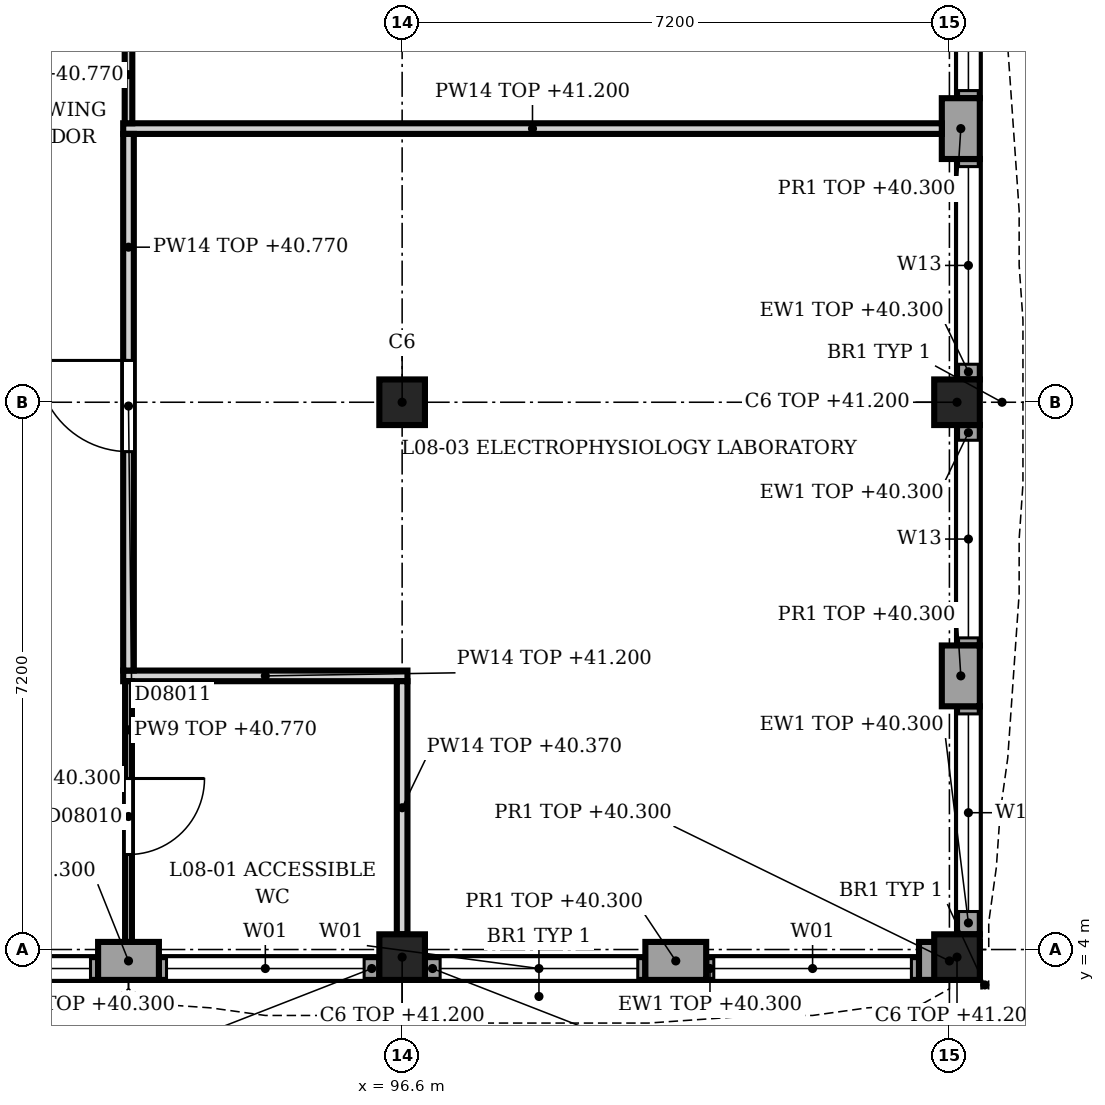
"""IFC4 building model, lengths in metres.
Left out: names, types, materials, properties, quantities, classifications, styles, units other than length and angle.
Written with IfcOpenShell. Run it as: python <this file> out.ifc"""

import sys

from ifc_helpers import new_model, si_unit, direction, frame, frame_2d, origin, origin_2d, place, context, subcontext, project, spatial, rectangle, extrude, element, fill, save


model = new_model("IFC4")
c1 = context("Model", 3, precision=1e-05, world=origin(), true_north=direction((0.0, 1.0)))
c2 = subcontext(c1, "Body", "Model", "MODEL_VIEW")
j1 = project(units=[si_unit("LENGTHUNIT", "METRE"), si_unit("PLANEANGLEUNIT", "RADIAN")], contexts=[c1])
p1 = place(None, origin())
s1 = spatial("IfcSite", under=j1, at=p1, CompositionType="ELEMENT")
p2 = place(p1, origin())
s2 = spatial("IfcBuilding", under=s1, at=p2, CompositionType="ELEMENT")
p3 = place(p2, frame((0.0, 0.0, 36.9)))
s3 = spatial("IfcBuildingStorey", under=s2, at=p3, CompositionType="ELEMENT", Elevation=36.9)
p4 = place(p3, frame((96.6, 3.9, 0.0), z_axis=(0.0, 0.0, 1.0), x_axis=(1.0, 0.0, 0.0)))
e1 = element("IfcColumn", 1, at=p4, inside=s3, PredefinedType="COLUMN", context=c2, shape_type="SweptSolid", body=[
    extrude(rectangle(XDim=0.6, YDim=0.6, at=origin_2d()), origin(), (0.0, 0.0, 1.0), 4.3),
])
p5 = place(p3, frame((96.6, 11.2, 0.0), z_axis=(0.0, 0.0, 1.0), x_axis=(1.0, 0.0, 0.0)))
e2 = element("IfcColumn", 2, at=p5, inside=s3, PredefinedType="COLUMN", context=c2, shape_type="SweptSolid", body=[
    extrude(rectangle(XDim=0.6, YDim=0.6, at=origin_2d()), origin(), (0.0, 0.0, 1.0), 4.5),
])
for number, where, z_axis, x_axis in (
    (3, (103.9, 3.9, 0.0), (0.0, 0.0, 1.0), (1.0, 0.0, 0.0)),
    (4, (103.9, 11.2, 0.0), (0.0, 0.0, 1.0), (1.0, 0.0, 0.0)),
):
    element("IfcColumn", number, at=place(p3, frame(where, z_axis=z_axis, x_axis=x_axis)), inside=s3, PredefinedType="COLUMN", context=c2, shape_type="SweptSolid", body=[
        extrude(rectangle(XDim=0.6, YDim=0.6, at=origin_2d()), origin(), (0.0, 0.0, 1.0), 4.3),
    ])
for number, where, z_axis, x_axis in (
    (5, (103.95, 15.2, 0.0), (0.0, 0.0, 1.0), (0.0, -1.0, 0.0)),
    (6, (103.95, 8.0, 0.0), (0.0, 0.0, 1.0), (0.0, -1.0, 0.0)),
):
    element("IfcWall", number, at=place(p3, frame(where, z_axis=z_axis, x_axis=x_axis)), inside=s3, PredefinedType="SOLIDWALL", context=c2, shape_type="SweptSolid", body=[
        extrude(rectangle(XDim=0.8, YDim=0.5, at=frame_2d((0.4, 0.0))), origin(), (0.0, 0.0, 1.0), 3.4),
    ])
p6 = place(p3, frame((104.05, 18.1, 0.0), z_axis=(0.0, 0.0, 1.0), x_axis=(0.0, -1.0, 0.0)))
e7 = element("IfcWall", 7, at=p6, inside=s3, PredefinedType="SOLIDWALL", context=c2, shape_type="SweptSolid", body=[
    extrude(rectangle(XDim=2.9, YDim=0.3, at=frame_2d((1.45, 0.0))), origin(), (0.0, 0.0, 1.0), 3.4),
])
p7 = place(p6, frame((0.2, 0.0, 0.9)))
e8 = element("IfcOpeningElement", 8, at=p7, cuts=e7, PredefinedType="OPENING", context=c2, shape_type="SweptSolid", body=[
    extrude(rectangle(XDim=2.6, YDim=2.2, at=frame_2d((1.3, 1.1))), frame((0.0, 0.16, 0.0), z_axis=(0.0, -1.0, 0.0), x_axis=(1.0, 0.0, 0.0)), (0.0, 0.0, 1.0), 0.32),
])
p8 = place(p3, frame((104.05, 14.4, 0.0), z_axis=(0.0, 0.0, 1.0), x_axis=(0.0, -1.0, 0.0)))
e9 = element("IfcWall", 9, at=p8, inside=s3, PredefinedType="SOLIDWALL", context=c2, shape_type="SweptSolid", body=[
    extrude(rectangle(XDim=2.9, YDim=0.3, at=frame_2d((1.45, 0.0))), origin(), (0.0, 0.0, 1.0), 3.4),
])
p9 = place(p8, frame((0.1, 0.0, 0.9)))
e10 = element("IfcOpeningElement", 10, at=p9, cuts=e9, PredefinedType="OPENING", context=c2, shape_type="SweptSolid", body=[
    extrude(rectangle(XDim=2.6, YDim=2.2, at=frame_2d((1.3, 1.1))), frame((0.0, 0.16, 0.0), z_axis=(0.0, -1.0, 0.0), x_axis=(1.0, 0.0, 0.0)), (0.0, 0.0, 1.0), 0.32),
])
p10 = place(p3, frame((104.05, 10.9, 0.0), z_axis=(0.0, 0.0, 1.0), x_axis=(0.0, -1.0, 0.0)))
e11 = element("IfcWall", 11, at=p10, inside=s3, PredefinedType="SOLIDWALL", context=c2, shape_type="SweptSolid", body=[
    extrude(rectangle(XDim=2.9, YDim=0.3, at=frame_2d((1.45, 0.0))), origin(), (0.0, 0.0, 1.0), 3.4),
])
p11 = place(p10, frame((0.2, 0.0, 0.9)))
e12 = element("IfcOpeningElement", 12, at=p11, cuts=e11, PredefinedType="OPENING", context=c2, shape_type="SweptSolid", body=[
    extrude(rectangle(XDim=2.6, YDim=2.2, at=frame_2d((1.3, 1.1))), frame((0.0, 0.16, 0.0), z_axis=(0.0, -1.0, 0.0), x_axis=(1.0, 0.0, 0.0)), (0.0, 0.0, 1.0), 0.32),
])
p12 = place(p3, frame((104.05, 7.2, 0.0), z_axis=(0.0, 0.0, 1.0), x_axis=(0.0, -1.0, 0.0)))
e13 = element("IfcWall", 13, at=p12, inside=s3, PredefinedType="SOLIDWALL", context=c2, shape_type="SweptSolid", body=[
    extrude(rectangle(XDim=3.0, YDim=0.3, at=frame_2d((1.5, 0.0))), origin(), (0.0, 0.0, 1.0), 3.4),
])
p13 = place(p12, frame((0.1, 0.0, 0.9)))
e14 = element("IfcOpeningElement", 14, at=p13, cuts=e13, PredefinedType="OPENING", context=c2, shape_type="SweptSolid", body=[
    extrude(rectangle(XDim=2.6, YDim=2.2, at=frame_2d((1.3, 1.1))), frame((0.0, 0.16, 0.0), z_axis=(0.0, -1.0, 0.0), x_axis=(1.0, 0.0, 0.0)), (0.0, 0.0, 1.0), 0.32),
])
for number, where, z_axis, x_axis in (
    (15, (104.2, 3.85, 0.0), (0.0, 0.0, 1.0), (-1.0, 0.0, 0.0)),
    (16, (100.6, 3.85, 0.0), (0.0, 0.0, 1.0), (-1.0, 0.0, 0.0)),
):
    element("IfcWall", number, at=place(p3, frame(where, z_axis=z_axis, x_axis=x_axis)), inside=s3, PredefinedType="SOLIDWALL", context=c2, shape_type="SweptSolid", body=[
        extrude(rectangle(XDim=0.8, YDim=0.5, at=frame_2d((0.4, 0.0))), origin(), (0.0, 0.0, 1.0), 3.4),
    ])
p14 = place(p3, frame((93.4, 3.85, 0.0), z_axis=(0.0, 0.0, 1.0), x_axis=(-1.0, 0.0, 0.0)))
e17 = element("IfcWall", 17, at=p14, inside=s3, PredefinedType="SOLIDWALL", context=c2, shape_type="SweptSolid", body=[
    extrude(rectangle(XDim=0.8, YDim=0.5, at=frame_2d((0.4, 0.0))), origin(), (0.0, 0.0, 1.0), 3.4),
])
p15 = place(p3, frame((103.4, 3.75, 0.0), z_axis=(0.0, 0.0, 1.0), x_axis=(-1.0, 0.0, 0.0)))
e18 = element("IfcWall", 18, at=p15, inside=s3, PredefinedType="SOLIDWALL", context=c2, shape_type="SweptSolid", body=[
    extrude(rectangle(XDim=2.8, YDim=0.3, at=frame_2d((1.4, 0.0))), origin(), (0.0, 0.0, 1.0), 3.4),
])
p16 = place(p15, frame((0.1, 0.0, 0.9)))
e19 = element("IfcOpeningElement", 19, at=p16, cuts=e18, PredefinedType="OPENING", context=c2, shape_type="SweptSolid", body=[
    extrude(rectangle(XDim=2.6, YDim=2.4, at=frame_2d((1.3, 1.2))), frame((0.0, 0.16, 0.0), z_axis=(0.0, -1.0, 0.0), x_axis=(1.0, 0.0, 0.0)), (0.0, 0.0, 1.0), 0.32),
])
p17 = place(p3, frame((99.8, 3.75, 0.0), z_axis=(0.0, 0.0, 1.0), x_axis=(-1.0, 0.0, 0.0)))
e20 = element("IfcWall", 20, at=p17, inside=s3, PredefinedType="SOLIDWALL", context=c2, shape_type="SweptSolid", body=[
    extrude(rectangle(XDim=2.9, YDim=0.3, at=frame_2d((1.45, 0.0))), origin(), (0.0, 0.0, 1.0), 3.4),
])
p18 = place(p17, frame((0.1, 0.0, 0.9)))
e21 = element("IfcOpeningElement", 21, at=p18, cuts=e20, PredefinedType="OPENING", context=c2, shape_type="SweptSolid", body=[
    extrude(rectangle(XDim=2.6, YDim=2.4, at=frame_2d((1.3, 1.2))), frame((0.0, 0.16, 0.0), z_axis=(0.0, -1.0, 0.0), x_axis=(1.0, 0.0, 0.0)), (0.0, 0.0, 1.0), 0.32),
])
p19 = place(p3, frame((96.3, 3.75, 0.0), z_axis=(0.0, 0.0, 1.0), x_axis=(-1.0, 0.0, 0.0)))
e22 = element("IfcWall", 22, at=p19, inside=s3, PredefinedType="SOLIDWALL", context=c2, shape_type="SweptSolid", body=[
    extrude(rectangle(XDim=2.9, YDim=0.3, at=frame_2d((1.45, 0.0))), origin(), (0.0, 0.0, 1.0), 3.4),
])
p20 = place(p19, frame((0.2, 0.0, 0.9)))
e23 = element("IfcOpeningElement", 23, at=p20, cuts=e22, PredefinedType="OPENING", context=c2, shape_type="SweptSolid", body=[
    extrude(rectangle(XDim=2.6, YDim=2.4, at=frame_2d((1.3, 1.2))), frame((0.0, 0.16, 0.0), z_axis=(0.0, -1.0, 0.0), x_axis=(1.0, 0.0, 0.0)), (0.0, 0.0, 1.0), 0.32),
])
p21 = place(p3, frame((92.6, 3.75, 0.0), z_axis=(0.0, 0.0, 1.0), x_axis=(-1.0, 0.0, 0.0)))
e24 = element("IfcWall", 24, at=p21, inside=s3, PredefinedType="SOLIDWALL", context=c2, shape_type="SweptSolid", body=[
    extrude(rectangle(XDim=2.9, YDim=0.3, at=frame_2d((1.45, 0.0))), origin(), (0.0, 0.0, 1.0), 3.4),
])
p22 = place(p21, frame((0.1, 0.0, 0.9)))
e25 = element("IfcOpeningElement", 25, at=p22, cuts=e24, PredefinedType="OPENING", context=c2, shape_type="SweptSolid", body=[
    extrude(rectangle(XDim=2.6, YDim=2.4, at=frame_2d((1.3, 1.2))), frame((0.0, 0.16, 0.0), z_axis=(0.0, -1.0, 0.0), x_axis=(1.0, 0.0, 0.0)), (0.0, 0.0, 1.0), 0.32),
])
p23 = place(p3, frame((92.93, 7.6, 0.0), z_axis=(0.0, 0.0, 1.0), x_axis=(1.0, 0.0, 0.0)))
e26 = element("IfcWall", 26, at=p23, inside=s3, PredefinedType="PARTITIONING", context=c2, shape_type="SweptSolid", body=[
    extrude(rectangle(XDim=3.74, YDim=0.14, at=frame_2d((1.87, 0.0))), origin(), (0.0, 0.0, 1.0), 4.3),
])
p24 = place(p3, frame((92.93, 14.8, 0.0), z_axis=(0.0, 0.0, 1.0), x_axis=(1.0, 0.0, 0.0)))
e27 = element("IfcWall", 27, at=p24, inside=s3, PredefinedType="PARTITIONING", context=c2, shape_type="SweptSolid", body=[
    extrude(rectangle(XDim=10.77, YDim=0.14, at=frame_2d((5.385, 0.0))), origin(), (0.0, 0.0, 1.0), 4.3),
])
p25 = place(p3, frame((93.0, 7.53, 0.0), z_axis=(0.0, 0.0, 1.0), x_axis=(0.0, -1.0, 0.0)))
e28 = element("IfcWall", 28, at=p25, inside=s3, PredefinedType="PARTITIONING", context=c2, shape_type="SweptSolid", body=[
    extrude(rectangle(XDim=3.43, YDim=0.09, at=frame_2d((1.715, 0.0))), origin(), (0.0, 0.0, 1.0), 3.87),
])
p26 = place(p25, frame((1.28, 0.0, 0.0)))
e29 = element("IfcOpeningElement", 29, at=p26, cuts=e28, PredefinedType="OPENING", context=c2, shape_type="SweptSolid", body=[
    extrude(rectangle(XDim=1.0, YDim=2.2, at=frame_2d((0.5, 1.1))), frame((0.0, 0.055, 0.0), z_axis=(0.0, -1.0, 0.0), x_axis=(1.0, 0.0, 0.0)), (0.0, 0.0, 1.0), 0.11),
])
p27 = place(p3, frame((93.0, 14.73, 0.0), z_axis=(0.0, 0.0, 1.0), x_axis=(0.0, -1.0, 0.0)))
e30 = element("IfcWall", 30, at=p27, inside=s3, PredefinedType="PARTITIONING", context=c2, shape_type="SweptSolid", body=[
    extrude(rectangle(XDim=7.06, YDim=0.14, at=frame_2d((3.53, 0.0))), origin(), (0.0, 0.0, 1.0), 3.87),
])
p28 = place(p27, frame((2.98, 0.0, 0.0)))
e31 = element("IfcOpeningElement", 31, at=p28, cuts=e30, PredefinedType="OPENING", context=c2, shape_type="SweptSolid", body=[
    extrude(rectangle(XDim=1.2, YDim=2.1, at=frame_2d((0.6, 1.05))), frame((0.0, 0.08, 0.0), z_axis=(0.0, -1.0, 0.0), x_axis=(1.0, 0.0, 0.0)), (0.0, 0.0, 1.0), 0.16),
])
p29 = place(p3, frame((93.0, 18.31, 0.0), z_axis=(0.0, 0.0, 1.0), x_axis=(0.0, -1.0, 0.0)))
e32 = element("IfcWall", 32, at=p29, inside=s3, PredefinedType="PARTITIONING", context=c2, shape_type="SweptSolid", body=[
    extrude(rectangle(XDim=3.44, YDim=0.1, at=frame_2d((1.72, 0.0))), origin(), (0.0, 0.0, 1.0), 3.87),
])
p30 = place(p29, frame((1.16, 0.0, 0.0)))
e33 = element("IfcOpeningElement", 33, at=p30, cuts=e32, PredefinedType="OPENING", context=c2, shape_type="SweptSolid", body=[
    extrude(rectangle(XDim=1.0, YDim=2.1, at=frame_2d((0.5, 1.05))), frame((0.0, 0.06, 0.0), z_axis=(0.0, -1.0, 0.0), x_axis=(1.0, 0.0, 0.0)), (0.0, 0.0, 1.0), 0.12),
])
p31 = place(p3, frame((96.6, 4.2, 0.0), z_axis=(0.0, 0.0, 1.0), x_axis=(0.0, 1.0, 0.0)))
e34 = element("IfcWall", 34, at=p31, inside=s3, PredefinedType="PARTITIONING", context=c2, shape_type="SweptSolid", body=[
    extrude(rectangle(XDim=3.33, YDim=0.14, at=frame_2d((1.665, 0.0))), origin(), (0.0, 0.0, 1.0), 3.47),
])
p32 = place(p7, origin())
e35 = element("IfcWindow", 35, at=p32, inside=s3, PartitioningType="SINGLE_PANEL", PredefinedType="WINDOW", context=c2, shape_type="SweptSolid", body=[
    extrude(rectangle(XDim=2.6, YDim=2.2, at=frame_2d((1.3, 1.1))), frame((0.0, 0.03, 0.0), z_axis=(0.0, -1.0, 0.0), x_axis=(1.0, 0.0, 0.0)), (0.0, 0.0, 1.0), 0.06),
])
fill(e8, e35)
p33 = place(p9, origin())
e36 = element("IfcWindow", 36, at=p33, inside=s3, PartitioningType="SINGLE_PANEL", PredefinedType="WINDOW", context=c2, shape_type="SweptSolid", body=[
    extrude(rectangle(XDim=2.6, YDim=2.2, at=frame_2d((1.3, 1.1))), frame((0.0, 0.03, 0.0), z_axis=(0.0, -1.0, 0.0), x_axis=(1.0, 0.0, 0.0)), (0.0, 0.0, 1.0), 0.06),
])
fill(e10, e36)
p34 = place(p11, origin())
e37 = element("IfcWindow", 37, at=p34, inside=s3, PartitioningType="SINGLE_PANEL", PredefinedType="WINDOW", context=c2, shape_type="SweptSolid", body=[
    extrude(rectangle(XDim=2.6, YDim=2.2, at=frame_2d((1.3, 1.1))), frame((0.0, 0.03, 0.0), z_axis=(0.0, -1.0, 0.0), x_axis=(1.0, 0.0, 0.0)), (0.0, 0.0, 1.0), 0.06),
])
fill(e12, e37)
p35 = place(p13, origin())
e38 = element("IfcWindow", 38, at=p35, inside=s3, PartitioningType="SINGLE_PANEL", PredefinedType="WINDOW", context=c2, shape_type="SweptSolid", body=[
    extrude(rectangle(XDim=2.6, YDim=2.2, at=frame_2d((1.3, 1.1))), frame((0.0, 0.03, 0.0), z_axis=(0.0, -1.0, 0.0), x_axis=(1.0, 0.0, 0.0)), (0.0, 0.0, 1.0), 0.06),
])
fill(e14, e38)
p36 = place(p16, origin())
e39 = element("IfcWindow", 39, at=p36, inside=s3, PartitioningType="SINGLE_PANEL", PredefinedType="WINDOW", context=c2, shape_type="SweptSolid", body=[
    extrude(rectangle(XDim=2.6, YDim=2.4, at=frame_2d((1.3, 1.2))), frame((0.0, 0.03, 0.0), z_axis=(0.0, -1.0, 0.0), x_axis=(1.0, 0.0, 0.0)), (0.0, 0.0, 1.0), 0.06),
])
fill(e19, e39)
p37 = place(p18, origin())
e40 = element("IfcWindow", 40, at=p37, inside=s3, PartitioningType="SINGLE_PANEL", PredefinedType="WINDOW", context=c2, shape_type="SweptSolid", body=[
    extrude(rectangle(XDim=2.6, YDim=2.4, at=frame_2d((1.3, 1.2))), frame((0.0, 0.03, 0.0), z_axis=(0.0, -1.0, 0.0), x_axis=(1.0, 0.0, 0.0)), (0.0, 0.0, 1.0), 0.06),
])
fill(e21, e40)
p38 = place(p20, origin())
e41 = element("IfcWindow", 41, at=p38, inside=s3, PartitioningType="SINGLE_PANEL", PredefinedType="WINDOW", context=c2, shape_type="SweptSolid", body=[
    extrude(rectangle(XDim=2.6, YDim=2.4, at=frame_2d((1.3, 1.2))), frame((0.0, 0.03, 0.0), z_axis=(0.0, -1.0, 0.0), x_axis=(1.0, 0.0, 0.0)), (0.0, 0.0, 1.0), 0.06),
])
fill(e23, e41)
p39 = place(p22, origin())
e42 = element("IfcWindow", 42, at=p39, inside=s3, PartitioningType="SINGLE_PANEL", PredefinedType="WINDOW", context=c2, shape_type="SweptSolid", body=[
    extrude(rectangle(XDim=2.6, YDim=2.4, at=frame_2d((1.3, 1.2))), frame((0.0, 0.03, 0.0), z_axis=(0.0, -1.0, 0.0), x_axis=(1.0, 0.0, 0.0)), (0.0, 0.0, 1.0), 0.06),
])
fill(e25, e42)
p40 = place(p26, origin())
e43 = element("IfcDoor", 43, at=p40, inside=s3, OperationType="SINGLE_SWING_RIGHT", PredefinedType="DOOR", context=c2, shape_type="SweptSolid", body=[
    extrude(rectangle(XDim=1.0, YDim=2.2, at=frame_2d((0.5, 1.1))), frame((0.0, 0.025, 0.0), z_axis=(0.0, -1.0, 0.0), x_axis=(1.0, 0.0, 0.0)), (0.0, 0.0, 1.0), 0.05),
])
fill(e29, e43)
p41 = place(p28, origin())
e44 = element("IfcDoor", 44, at=p41, inside=s3, OperationType="SINGLE_SWING_RIGHT", PredefinedType="DOOR", context=c2, shape_type="SweptSolid", body=[
    extrude(rectangle(XDim=1.2, YDim=2.1, at=frame_2d((0.6, 1.05))), frame((0.0, 0.025, 0.0), z_axis=(0.0, -1.0, 0.0), x_axis=(1.0, 0.0, 0.0)), (0.0, 0.0, 1.0), 0.05),
])
fill(e31, e44)
save(model, sys.argv[1])
